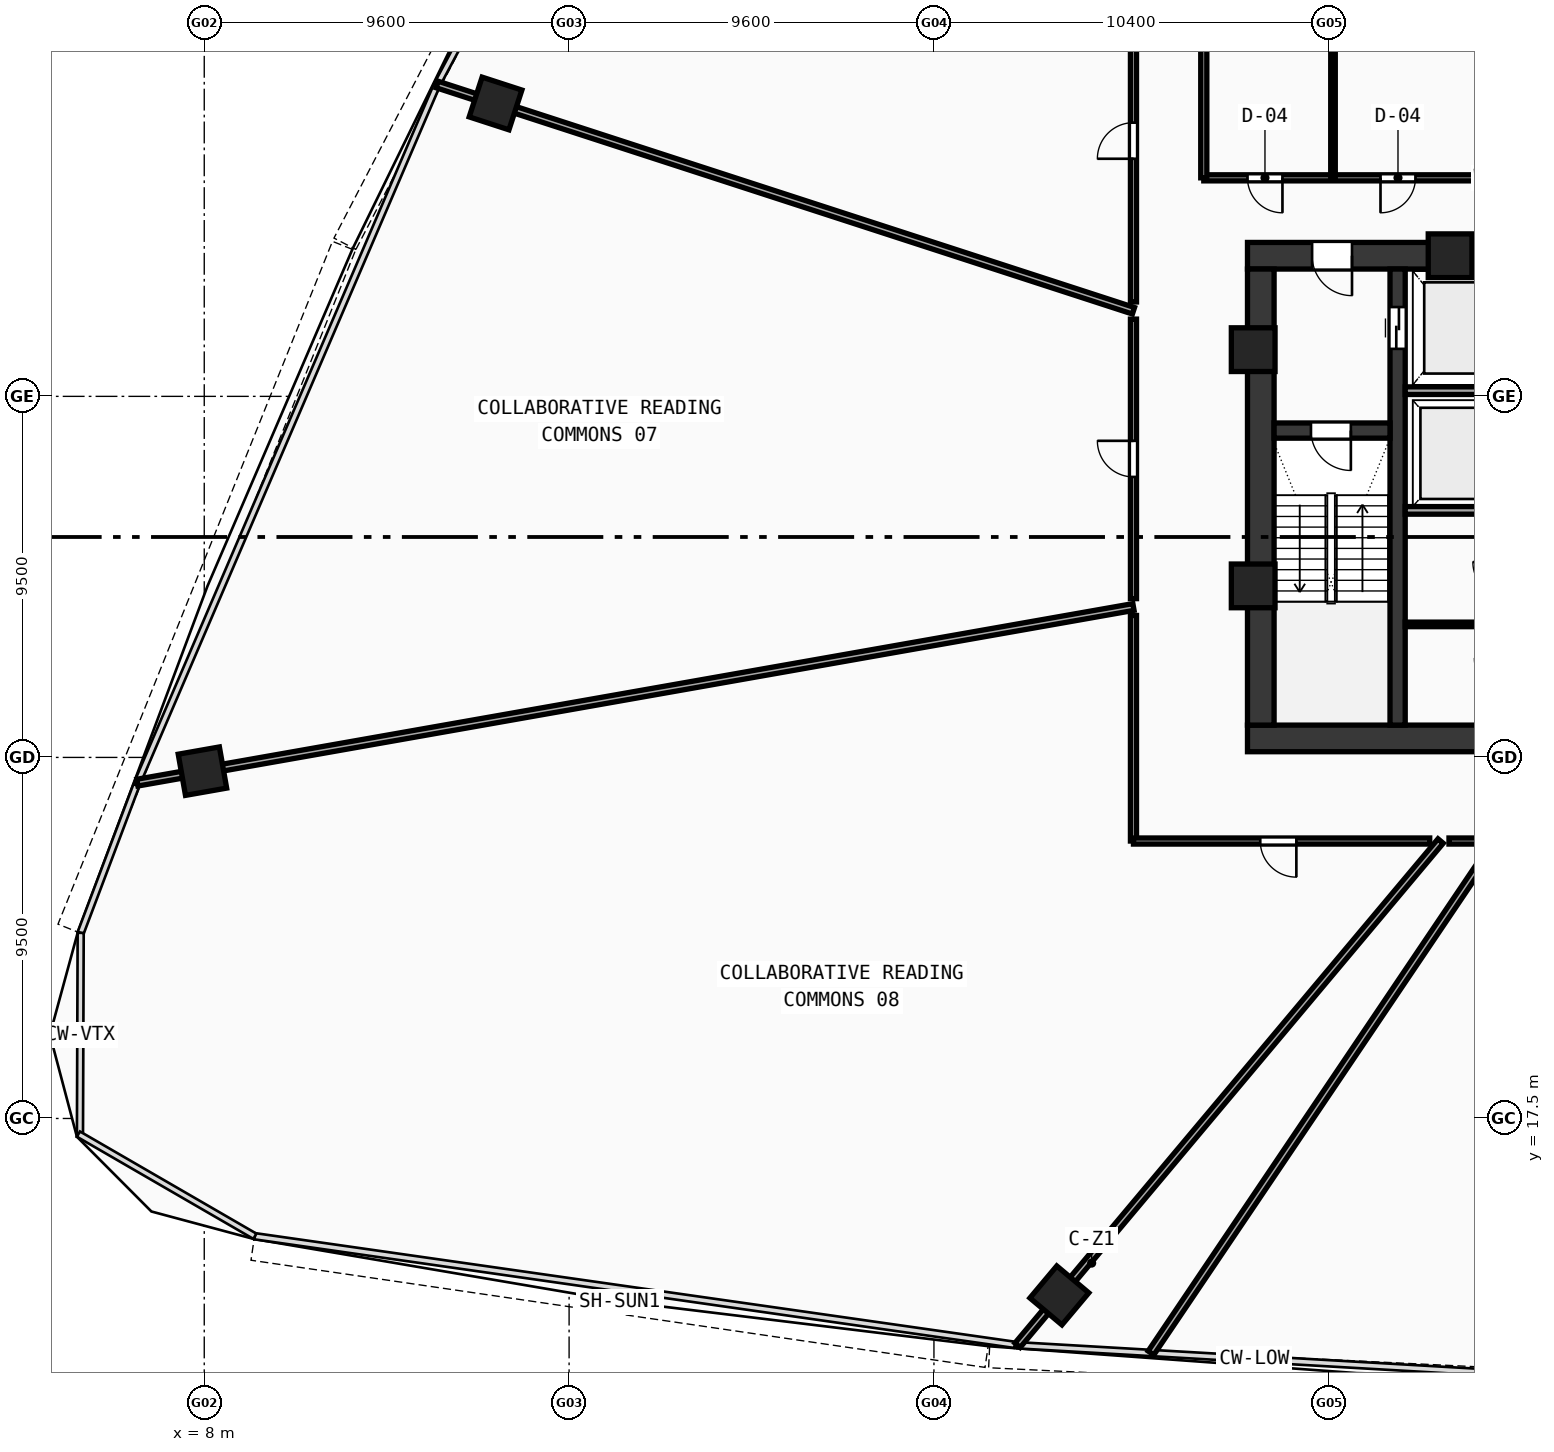
"""IFC4 building model, lengths in metres.
Left out: names, types, materials, properties, quantities, classifications, styles, units other than length and angle.
Written with IfcOpenShell. Run it as: python <this file> out.ifc"""

import sys

from ifc_helpers import new_model, si_unit, direction, frame, frame_2d, origin, origin_with_axes, origin_2d, place, context, subcontext, project, spatial, rectangle, hollow_rectangle, extrude, source, transform, mapped, element, fill, save


model = new_model("IFC4")
c1 = context("Model", 3, precision=1e-05, world=origin(), true_north=direction((0.0, 1.0)))
c2 = subcontext(c1, "Body", "Model", "MODEL_VIEW")
j1 = project(units=[si_unit("LENGTHUNIT", "METRE"), si_unit("PLANEANGLEUNIT", "RADIAN")], contexts=[c1])
p1 = place(None, origin())
s1 = spatial("IfcSite", under=j1, at=p1, CompositionType="ELEMENT")
p2 = place(p1, origin())
s2 = spatial("IfcBuilding", under=s1, at=p2, CompositionType="ELEMENT")
p3 = place(p2, frame((0.0, 0.0, 41.29)))
s3 = spatial("IfcBuildingStorey", under=s2, at=p3, CompositionType="ELEMENT", Elevation=41.29)
p4 = place(p3, frame((35.45, 27.5, 0.0), z_axis=(0.0, 0.0, 1.0), x_axis=(1.0, 0.0, 0.0)))
e1 = element("IfcWall", 1, at=p4, inside=s3, PredefinedType="SHEAR", context=c2, shape_type="SweptSolid", body=[
    extrude(rectangle(XDim=25.1, YDim=0.7, at=frame_2d((12.55, 0.0))), origin(), (0.0, 0.0, 1.0), 3.37),
])
p5 = place(p3, frame((35.45, 40.2, 0.0), z_axis=(0.0, 0.0, 1.0), x_axis=(1.0, 0.0, 0.0)))
e2 = element("IfcWall", 2, at=p5, inside=s3, PredefinedType="SHEAR", context=c2, shape_type="SweptSolid", body=[
    extrude(rectangle(XDim=11.35, YDim=0.7, at=frame_2d((5.675, 0.0))), origin(), (0.0, 0.0, 1.0), 3.37),
])
p6 = place(p5, frame((1.7, 0.0, 0.0)))
e3 = element("IfcOpeningElement", 3, at=p6, cuts=e2, PredefinedType="OPENING", context=c2, shape_type="SweptSolid", body=[
    extrude(rectangle(XDim=1.05, YDim=2.1, at=frame_2d((0.525, 1.05))), frame((0.0, 0.36, 0.0), z_axis=(0.0, -1.0, 0.0), x_axis=(1.0, 0.0, 0.0)), (0.0, 0.0, 1.0), 0.72),
])
p7 = place(p3, frame((35.8, 27.85, 0.0), z_axis=(0.0, 0.0, 1.0), x_axis=(0.0, 1.0, 0.0)))
e4 = element("IfcWall", 4, at=p7, inside=s3, PredefinedType="SHEAR", context=c2, shape_type="SweptSolid", body=[
    extrude(rectangle(XDim=12.0, YDim=0.7, at=frame_2d((6.0, 0.0))), origin(), (0.0, 0.0, 1.0), 3.37),
])
p8 = place(p3, frame((39.4, 27.85, 0.0), z_axis=(0.0, 0.0, 1.0), x_axis=(0.0, 1.0, 0.0)))
e5 = element("IfcWall", 5, at=p8, inside=s3, PredefinedType="SHEAR", context=c2, shape_type="SweptSolid", body=[
    extrude(rectangle(XDim=12.0, YDim=0.4, at=frame_2d((6.0, 0.0))), origin(), (0.0, 0.0, 1.0), 3.37),
])
p9 = place(p8, frame((9.9, 0.0, 0.0)))
e6 = element("IfcOpeningElement", 6, at=p9, cuts=e5, PredefinedType="OPENING", context=c2, shape_type="SweptSolid", body=[
    extrude(rectangle(XDim=1.1, YDim=2.1, at=frame_2d((0.55, 1.05))), frame((0.0, 0.21, 0.0), z_axis=(0.0, -1.0, 0.0), x_axis=(1.0, 0.0, 0.0)), (0.0, 0.0, 1.0), 0.42),
])
p10 = place(p3, frame((36.15, 35.6, 0.0), z_axis=(0.0, 0.0, 1.0), x_axis=(1.0, 0.0, 0.0)))
e7 = element("IfcWall", 7, at=p10, inside=s3, PredefinedType="SHEAR", context=c2, shape_type="SweptSolid", body=[
    extrude(rectangle(XDim=3.05, YDim=0.4, at=frame_2d((1.525, 0.0))), origin(), (0.0, 0.0, 1.0), 3.37),
])
p11 = place(p10, frame((0.97, 0.0, 0.0)))
e8 = element("IfcOpeningElement", 8, at=p11, cuts=e7, PredefinedType="OPENING", context=c2, shape_type="SweptSolid", body=[
    extrude(rectangle(XDim=1.05, YDim=2.1, at=frame_2d((0.525, 1.05))), frame((0.0, 0.21, 0.0), z_axis=(0.0, -1.0, 0.0), x_axis=(1.0, 0.0, 0.0)), (0.0, 0.0, 1.0), 0.42),
])
m1 = source(origin(), c2, "Body", "SweptSolid", [
    extrude(hollow_rectangle(XDim=1.15, YDim=1.15, WallThickness=0.048, at=origin_2d()), origin(), (0.0, 0.0, 1.0), 3.63),
])
for number, where, z_axis, x_axis in (
    (9, (40.781, 40.2, -0.26), (0.0, 0.0, 1.0), (1.0, 0.0, 0.0)),
    (10, (35.6, 37.729, -0.26), (0.0, 0.0, 1.0), (1.0, 0.0, 0.0)),
    (11, (35.6, 31.513, -0.26), (0.0, 0.0, 1.0), (1.0, 0.0, 0.0)),
):
    element("IfcColumn", number, at=place(p3, frame(where, z_axis=z_axis, x_axis=x_axis)), inside=s3, PredefinedType="COLUMN", context=c2, shape_type="MappedRepresentation", body=[
        mapped(m1, transform((0.0, 0.0, 0.0), scale=1.0)),
    ])
m2 = source(origin(), c2, "Body", "SweptSolid", [
    extrude(hollow_rectangle(XDim=1.1, YDim=1.1, WallThickness=0.045, at=origin_2d()), origin(), (0.0, 0.0, 1.0), 3.63),
])
for number, where, z_axis, x_axis in (
    (12, (30.5, 12.844, -0.26), (0.0, 0.0, 1.0), (0.766, -0.643, 0.0)),
    (13, (15.665, 44.206, -0.26), (0.0, 0.0, 1.0), (-0.309, -0.951, 0.0)),
    (14, (7.952, 26.638, -0.26), (0.0, 0.0, 1.0), (0.174, -0.985, 0.0)),
):
    element("IfcColumn", number, at=place(p3, frame(where, z_axis=z_axis, x_axis=x_axis)), inside=s3, PredefinedType="COLUMN", context=c2, shape_type="MappedRepresentation", body=[
        mapped(m2, transform((0.0, 0.0, 0.0), scale=1.0)),
    ])
for number, where, z_axis, x_axis in (
    (15, (39.6, 36.65, 0.0), (0.0, 0.0, 1.0), (1.0, 0.0, 0.0)),
    (16, (39.6, 33.5, 0.0), (0.0, 0.0, 1.0), (1.0, 0.0, 0.0)),
):
    element("IfcWall", number, at=place(p3, frame(where, z_axis=z_axis, x_axis=x_axis)), inside=s3, PredefinedType="SOLIDWALL", context=c2, shape_type="SweptSolid", body=[
        extrude(rectangle(XDim=2.72, YDim=0.2, at=frame_2d((1.36, 0.0))), origin(), (0.0, 0.0, 1.0), 3.37),
    ])
p12 = place(p3, frame((39.6, 30.5, 0.0), z_axis=(0.0, 0.0, 1.0), x_axis=(1.0, 0.0, 0.0)))
e17 = element("IfcWall", 17, at=p12, inside=s3, PredefinedType="PARTITIONING", context=c2, shape_type="SweptSolid", body=[
    extrude(rectangle(XDim=2.72, YDim=0.12, at=frame_2d((1.36, 0.0))), origin(), (0.0, 0.0, 1.0), 3.37),
])
p13 = place(p3, frame((34.3, 42.25, 0.0), z_axis=(0.0, 0.0, 1.0), x_axis=(1.0, 0.0, 0.0)))
e18 = element("IfcWall", 18, at=p13, inside=s3, PredefinedType="PARTITIONING", context=c2, shape_type="SweptSolid", body=[
    extrude(rectangle(XDim=9.58, YDim=0.16, at=frame_2d((4.79, 0.0))), origin(), (0.0, 0.0, 1.0), 2.67),
])
p14 = place(p13, frame((1.15, 0.0, 0.0)))
e19 = element("IfcOpeningElement", 19, at=p14, cuts=e18, PredefinedType="OPENING", context=c2, shape_type="SweptSolid", body=[
    extrude(rectangle(XDim=0.92, YDim=2.1, at=frame_2d((0.46, 1.05))), frame((0.0, 0.09, 0.0), z_axis=(0.0, -1.0, 0.0), x_axis=(1.0, 0.0, 0.0)), (0.0, 0.0, 1.0), 0.18),
])
p15 = place(p13, frame((4.65, 0.0, 0.0)))
e20 = element("IfcOpeningElement", 20, at=p15, cuts=e18, PredefinedType="OPENING", context=c2, shape_type="SweptSolid", body=[
    extrude(rectangle(XDim=0.92, YDim=2.1, at=frame_2d((0.46, 1.05))), frame((0.0, 0.09, 0.0), z_axis=(0.0, -1.0, 0.0), x_axis=(1.0, 0.0, 0.0)), (0.0, 0.0, 1.0), 0.18),
])
p16 = place(p3, frame((34.3, 42.25, 0.0), z_axis=(0.0, 0.0, 1.0), x_axis=(0.0, 1.0, 0.0)))
e21 = element("IfcWall", 21, at=p16, inside=s3, PredefinedType="PARTITIONING", context=c2, shape_type="SweptSolid", body=[
    extrude(rectangle(XDim=11.7, YDim=0.16, at=frame_2d((5.85, 0.0))), origin(), (0.0, 0.0, 1.0), 2.67),
])
p17 = place(p3, frame((37.7, 42.25, 0.0), z_axis=(0.0, 0.0, 1.0), x_axis=(0.0, 1.0, 0.0)))
e22 = element("IfcWall", 22, at=p17, inside=s3, PredefinedType="PARTITIONING", context=c2, shape_type="SweptSolid", body=[
    extrude(rectangle(XDim=11.7, YDim=0.12, at=frame_2d((5.85, 0.0))), origin(), (0.0, 0.0, 1.0), 2.67),
])
p18 = place(p3, frame((32.45, 38.752, 0.0), z_axis=(0.0, 0.0, 1.0), x_axis=(-0.951055021268, 0.309021595557, 0.0)))
e23 = element("IfcWall", 23, at=p18, inside=s3, PredefinedType="PARTITIONING", context=c2, shape_type="SweptSolid", body=[
    extrude(rectangle(XDim=19.264, YDim=0.18, at=frame_2d((9.632, 0.0))), origin(), (0.0, 0.0, 1.0), 2.67),
])
p19 = place(p3, frame((32.45, 30.958, 0.0), z_axis=(0.0, 0.0, 1.0), x_axis=(-0.984808390998, -0.173644559431, 0.0)))
e24 = element("IfcWall", 24, at=p19, inside=s3, PredefinedType="PARTITIONING", context=c2, shape_type="SweptSolid", body=[
    extrude(rectangle(XDim=26.614, YDim=0.18, at=frame_2d((13.307, 0.0))), origin(), (0.0, 0.0, 1.0), 2.67),
])
p20 = place(p3, frame((40.532, 24.8, 0.0), z_axis=(0.0, 0.0, 1.0), x_axis=(-0.642784696521, -0.766046887546, 0.0)))
e25 = element("IfcWall", 25, at=p20, inside=s3, PredefinedType="PARTITIONING", context=c2, shape_type="SweptSolid", body=[
    extrude(rectangle(XDim=17.319, YDim=0.18, at=frame_2d((8.659, 0.0))), origin(), (0.0, 0.0, 1.0), 2.67),
])
p21 = place(p3, frame((41.997, 24.8, 0.0), z_axis=(0.0, 0.0, 1.0), x_axis=(-0.559182499599, -0.82904458996, 0.0)))
e26 = element("IfcWall", 26, at=p21, inside=s3, PredefinedType="PARTITIONING", context=c2, shape_type="SweptSolid", body=[
    extrude(rectangle(XDim=16.248, YDim=0.18, at=frame_2d((8.124, 0.0))), origin(), (0.0, 0.0, 1.0), 2.67),
])
p22 = place(p3, frame((32.45, 24.8, 0.0), z_axis=(0.0, 0.0, 1.0), x_axis=(0.0, 1.0, 0.0)))
e27 = element("IfcWall", 27, at=p22, inside=s3, PredefinedType="PARTITIONING", context=c2, shape_type="SweptSolid", body=[
    extrude(rectangle(XDim=5.935, YDim=0.16, at=frame_2d((2.967, 0.0))), origin(), (0.0, 0.0, 1.0), 2.97),
])
p23 = place(p3, frame((32.45, 31.178, 0.0), z_axis=(0.0, 0.0, 1.0), x_axis=(0.0, 1.0, 0.0)))
e28 = element("IfcWall", 28, at=p23, inside=s3, PredefinedType="PARTITIONING", context=c2, shape_type="SweptSolid", body=[
    extrude(rectangle(XDim=7.355, YDim=0.16, at=frame_2d((3.677, 0.0))), origin(), (0.0, 0.0, 1.0), 3.37),
])
p24 = place(p23, frame((3.202, 0.0, 0.0)))
e29 = element("IfcOpeningElement", 29, at=p24, cuts=e28, PredefinedType="OPENING", context=c2, shape_type="SweptSolid", body=[
    extrude(rectangle(XDim=0.95, YDim=2.1, at=frame_2d((0.475, 1.05))), frame((0.0, 0.09, 0.0), z_axis=(0.0, -1.0, 0.0), x_axis=(1.0, 0.0, 0.0)), (0.0, 0.0, 1.0), 0.18),
])
p25 = place(p3, frame((32.45, 38.984, 0.0), z_axis=(0.0, 0.0, 1.0), x_axis=(0.0, 1.0, 0.0)))
e30 = element("IfcWall", 30, at=p25, inside=s3, PredefinedType="PARTITIONING", context=c2, shape_type="SweptSolid", body=[
    extrude(rectangle(XDim=8.498, YDim=0.16, at=frame_2d((4.249, 0.0))), origin(), (0.0, 0.0, 1.0), 2.67),
])
p26 = place(p25, frame((3.768, 0.0, 0.0)))
e31 = element("IfcOpeningElement", 31, at=p26, cuts=e30, PredefinedType="OPENING", context=c2, shape_type="SweptSolid", body=[
    extrude(rectangle(XDim=0.95, YDim=2.1, at=frame_2d((0.475, 1.05))), frame((0.0, 0.09, 0.0), z_axis=(0.0, -1.0, 0.0), x_axis=(1.0, 0.0, 0.0)), (0.0, 0.0, 1.0), 0.18),
])
p27 = place(p3, frame((41.731, 24.8, 0.0), z_axis=(0.0, 0.0, 1.0), x_axis=(-1.0, 0.0, 0.0)))
e32 = element("IfcWall", 32, at=p27, inside=s3, PredefinedType="PARTITIONING", context=c2, shape_type="SweptSolid", body=[
    extrude(rectangle(XDim=0.979, YDim=0.16, at=frame_2d((0.49, 0.0))), origin(), (0.0, 0.0, 1.0), 2.67),
])
p28 = place(p3, frame((40.245, 24.8, 0.0), z_axis=(0.0, 0.0, 1.0), x_axis=(-1.0, 0.0, 0.0)))
e33 = element("IfcWall", 33, at=p28, inside=s3, PredefinedType="PARTITIONING", context=c2, shape_type="SweptSolid", body=[
    extrude(rectangle(XDim=7.795, YDim=0.16, at=frame_2d((3.897, 0.0))), origin(), (0.0, 0.0, 1.0), 2.97),
])
p29 = place(p28, frame((3.509, 0.0, 0.0)))
e34 = element("IfcOpeningElement", 34, at=p29, cuts=e33, PredefinedType="OPENING", context=c2, shape_type="SweptSolid", body=[
    extrude(rectangle(XDim=0.95, YDim=2.1, at=frame_2d((0.475, 1.05))), frame((0.0, 0.09, 0.0), z_axis=(0.0, -1.0, 0.0), x_axis=(1.0, 0.0, 0.0)), (0.0, 0.0, 1.0), 0.18),
])
m3 = source(origin(), c2, "Body", "SweptSolid", [
    extrude(rectangle(XDim=1.05, YDim=2.1, at=frame_2d((0.525, 1.05))), frame((0.0, 0.025, 0.0), z_axis=(0.0, -1.0, 0.0), x_axis=(1.0, 0.0, 0.0)), (0.0, 0.0, 1.0), 0.05),
])
p30 = place(p11, frame((1.05, 0.0, 0.0), z_axis=(0.0, 0.0, 1.0), x_axis=(-1.0, 0.0, 0.0)))
e35 = element("IfcDoor", 35, at=p30, inside=s3, OperationType="SINGLE_SWING_LEFT", PredefinedType="DOOR", context=c2, shape_type="MappedRepresentation", body=[
    mapped(m3, transform((0.0, 0.0, 0.0), scale=1.0)),
])
fill(e8, e35)
p31 = place(p6, frame((1.05, 0.0, 0.0), z_axis=(0.0, 0.0, 1.0), x_axis=(-1.0, 0.0, 0.0)))
e36 = element("IfcDoor", 36, at=p31, inside=s3, OperationType="SINGLE_SWING_LEFT", PredefinedType="DOOR", context=c2, shape_type="MappedRepresentation", body=[
    mapped(m3, transform((0.0, 0.0, 0.0), scale=1.0)),
])
fill(e3, e36)
m4 = source(origin(), c2, "Body", "SweptSolid", [
    extrude(rectangle(XDim=1.1, YDim=2.1, at=frame_2d((0.55, 1.05))), frame((0.0, 0.025, 0.0), z_axis=(0.0, -1.0, 0.0), x_axis=(1.0, 0.0, 0.0)), (0.0, 0.0, 1.0), 0.05),
])
p32 = place(p9, frame((1.1, 0.0, 0.0), z_axis=(0.0, 0.0, 1.0), x_axis=(-1.0, 0.0, 0.0)))
e37 = element("IfcDoor", 37, at=p32, inside=s3, OperationType="DOUBLE_DOOR_SLIDING", PredefinedType="DOOR", context=c2, shape_type="MappedRepresentation", body=[
    mapped(m4, transform((0.0, 0.0, 0.0), scale=1.0)),
])
fill(e6, e37)
m5 = source(origin(), c2, "Body", "SweptSolid", [
    extrude(rectangle(XDim=0.92, YDim=2.1, at=frame_2d((0.46, 1.05))), frame((0.0, 0.025, 0.0), z_axis=(0.0, -1.0, 0.0), x_axis=(1.0, 0.0, 0.0)), (0.0, 0.0, 1.0), 0.05),
])
p33 = place(p14, frame((0.92, 0.0, 0.0), z_axis=(0.0, 0.0, 1.0), x_axis=(-1.0, 0.0, 0.0)))
e38 = element("IfcDoor", 38, at=p33, inside=s3, OperationType="SINGLE_SWING_LEFT", PredefinedType="DOOR", context=c2, shape_type="MappedRepresentation", body=[
    mapped(m5, transform((0.0, 0.0, 0.0), scale=1.0)),
])
fill(e19, e38)
p34 = place(p15, frame((0.92, 0.0, 0.0), z_axis=(0.0, 0.0, 1.0), x_axis=(-1.0, 0.0, 0.0)))
e39 = element("IfcDoor", 39, at=p34, inside=s3, OperationType="SINGLE_SWING_RIGHT", PredefinedType="DOOR", context=c2, shape_type="MappedRepresentation", body=[
    mapped(m5, transform((0.0, 0.0, 0.0), scale=1.0)),
])
fill(e20, e39)
m6 = source(origin(), c2, "Body", "SweptSolid", [
    extrude(rectangle(XDim=0.95, YDim=2.1, at=frame_2d((0.475, 1.05))), frame((0.0, 0.025, 0.0), z_axis=(0.0, -1.0, 0.0), x_axis=(1.0, 0.0, 0.0)), (0.0, 0.0, 1.0), 0.05),
])
p35 = place(p26, origin_with_axes())
e40 = element("IfcDoor", 40, at=p35, inside=s3, OperationType="SINGLE_SWING_LEFT", PredefinedType="DOOR", context=c2, shape_type="MappedRepresentation", body=[
    mapped(m6, transform((0.0, 0.0, 0.0), scale=1.0)),
])
fill(e31, e40)
p36 = place(p24, origin_with_axes())
e41 = element("IfcDoor", 41, at=p36, inside=s3, OperationType="SINGLE_SWING_RIGHT", PredefinedType="DOOR", context=c2, shape_type="MappedRepresentation", body=[
    mapped(m6, transform((0.0, 0.0, 0.0), scale=1.0)),
])
fill(e29, e41)
p37 = place(p29, origin_with_axes())
e42 = element("IfcDoor", 42, at=p37, inside=s3, OperationType="SINGLE_SWING_LEFT", PredefinedType="DOOR", context=c2, shape_type="MappedRepresentation", body=[
    mapped(m6, transform((0.0, 0.0, 0.0), scale=1.0)),
])
fill(e34, e42)
save(model, sys.argv[1])
